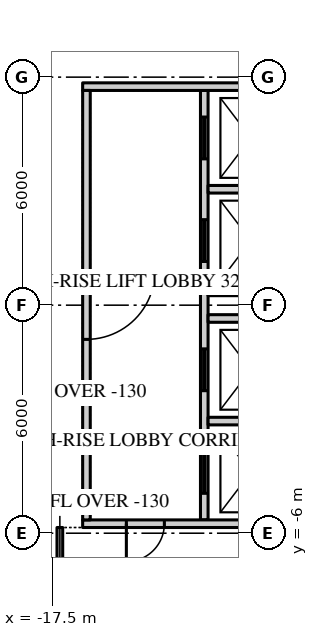
"""IFC4 building model, lengths in metres.
Left out: names, types, materials, properties, quantities, classifications, styles, units other than length and angle.
Written with IfcOpenShell. Run it as: python <this file> out.ifc"""

import sys

from ifc_helpers import new_model, si_unit, direction, frame, frame_2d, origin, place, context, subcontext, project, spatial, rectangle, extrude, element, fill, save


model = new_model("IFC4")
c1 = context("Model", 3, precision=1e-05, world=origin(), true_north=direction((0.0, 1.0)))
c2 = subcontext(c1, "Body", "Model", "MODEL_VIEW")
j1 = project(units=[si_unit("LENGTHUNIT", "METRE"), si_unit("PLANEANGLEUNIT", "RADIAN")], contexts=[c1])
p1 = place(None, origin())
s1 = spatial("IfcSite", under=j1, at=p1, CompositionType="ELEMENT")
p2 = place(p1, origin())
s2 = spatial("IfcBuilding", under=s1, at=p2, CompositionType="ELEMENT")
p3 = place(p2, frame((0.0, 0.0, 204.9)))
s3 = spatial("IfcBuildingStorey", under=s2, at=p3, CompositionType="ELEMENT", Elevation=204.9)
p4 = place(p3, frame((-13.5, 5.65, 0.0), z_axis=(0.0, 0.0, 1.0), x_axis=(0.0, -1.0, 0.0)))
e1 = element("IfcWall", 1, at=p4, inside=s3, PredefinedType="SOLIDWALL", context=c2, shape_type="SweptSolid", body=[
    extrude(rectangle(XDim=11.3, YDim=0.2, at=frame_2d((5.65, 0.0))), origin(), (0.0, 0.0, 1.0), 3.7),
])
p5 = place(p4, frame((0.7, 0.0, 0.0)))
e2 = element("IfcOpeningElement", 2, at=p5, cuts=e1, PredefinedType="OPENING", context=c2, shape_type="SweptSolid", body=[
    extrude(rectangle(XDim=1.1, YDim=2.2, at=frame_2d((0.55, 1.1))), frame((0.0, 0.11, 0.0), z_axis=(0.0, -1.0, 0.0), x_axis=(1.0, 0.0, 0.0)), (0.0, 0.0, 1.0), 0.22),
])
p6 = place(p4, frame((3.4, 0.0, 0.0)))
e3 = element("IfcOpeningElement", 3, at=p6, cuts=e1, PredefinedType="OPENING", context=c2, shape_type="SweptSolid", body=[
    extrude(rectangle(XDim=1.1, YDim=2.2, at=frame_2d((0.55, 1.1))), frame((0.0, 0.11, 0.0), z_axis=(0.0, -1.0, 0.0), x_axis=(1.0, 0.0, 0.0)), (0.0, 0.0, 1.0), 0.22),
])
p7 = place(p4, frame((6.8, 0.0, 0.0)))
e4 = element("IfcOpeningElement", 4, at=p7, cuts=e1, PredefinedType="OPENING", context=c2, shape_type="SweptSolid", body=[
    extrude(rectangle(XDim=1.1, YDim=2.2, at=frame_2d((0.55, 1.1))), frame((0.0, 0.11, 0.0), z_axis=(0.0, -1.0, 0.0), x_axis=(1.0, 0.0, 0.0)), (0.0, 0.0, 1.0), 0.22),
])
p8 = place(p4, frame((9.5, 0.0, 0.0)))
e5 = element("IfcOpeningElement", 5, at=p8, cuts=e1, PredefinedType="OPENING", context=c2, shape_type="SweptSolid", body=[
    extrude(rectangle(XDim=1.1, YDim=2.2, at=frame_2d((0.55, 1.1))), frame((0.0, 0.11, 0.0), z_axis=(0.0, -1.0, 0.0), x_axis=(1.0, 0.0, 0.0)), (0.0, 0.0, 1.0), 0.22),
])
p9 = place(p3, frame((-11.15, 5.75, 0.0), z_axis=(0.0, 0.0, 1.0), x_axis=(-1.0, 0.0, 0.0)))
e6 = element("IfcWall", 6, at=p9, inside=s3, PredefinedType="SOLIDWALL", context=c2, shape_type="SweptSolid", body=[
    extrude(rectangle(XDim=5.55, YDim=0.2, at=frame_2d((2.775, 0.0))), origin(), (0.0, 0.0, 1.0), 3.7),
])
p10 = place(p3, frame((-11.15, -5.75, 0.0), z_axis=(0.0, 0.0, 1.0), x_axis=(-1.0, 0.0, 0.0)))
e7 = element("IfcWall", 7, at=p10, inside=s3, PredefinedType="SOLIDWALL", context=c2, shape_type="SweptSolid", body=[
    extrude(rectangle(XDim=5.55, YDim=0.2, at=frame_2d((2.775, 0.0))), origin(), (0.0, 0.0, 1.0), 3.7),
])
p11 = place(p10, frame((3.4, 0.0, 0.0)))
e8 = element("IfcOpeningElement", 8, at=p11, cuts=e7, PredefinedType="OPENING", context=c2, shape_type="SweptSolid", body=[
    extrude(rectangle(XDim=1.0, YDim=2.2, at=frame_2d((0.5, 1.1))), frame((0.0, 0.11, 0.0), z_axis=(0.0, -1.0, 0.0), x_axis=(1.0, 0.0, 0.0)), (0.0, 0.0, 1.0), 0.22),
])
for number, where, z_axis, x_axis in (
    (9, (-11.15, 3.05, 0.0), (0.0, 0.0, 1.0), (-1.0, 0.0, 0.0)),
    (10, (-11.15, 0.35, 0.0), (0.0, 0.0, 1.0), (-1.0, 0.0, 0.0)),
    (11, (-11.15, -0.35, 0.0), (0.0, 0.0, 1.0), (-1.0, 0.0, 0.0)),
    (12, (-11.15, -3.05, 0.0), (0.0, 0.0, 1.0), (-1.0, 0.0, 0.0)),
):
    element("IfcWall", number, at=place(p3, frame(where, z_axis=z_axis, x_axis=x_axis)), inside=s3, PredefinedType="SOLIDWALL", context=c2, shape_type="SweptSolid", body=[
        extrude(rectangle(XDim=2.25, YDim=0.2, at=frame_2d((1.125, 0.0))), origin(), (0.0, 0.0, 1.0), 3.7),
    ])
p12 = place(p3, frame((-16.6, 5.65, 0.0), z_axis=(0.0, 0.0, 1.0), x_axis=(0.0, -1.0, 0.0)))
e13 = element("IfcWall", 13, at=p12, inside=s3, PredefinedType="SOLIDWALL", context=c2, shape_type="SweptSolid", body=[
    extrude(rectangle(XDim=11.3, YDim=0.2, at=frame_2d((5.65, 0.0))), origin(), (0.0, 0.0, 1.0), 3.18),
])
p13 = place(p12, frame((4.75, 0.0, 0.0)))
e14 = element("IfcOpeningElement", 14, at=p13, cuts=e13, PredefinedType="OPENING", context=c2, shape_type="SweptSolid", body=[
    extrude(rectangle(XDim=1.8, YDim=2.2, at=frame_2d((0.9, 1.1))), frame((0.0, 0.11, 0.0), z_axis=(0.0, -1.0, 0.0), x_axis=(1.0, 0.0, 0.0)), (0.0, 0.0, 1.0), 0.22),
])
p14 = place(p3, frame((-17.3, -5.85, 0.0), z_axis=(0.0, 0.0, 1.0), x_axis=(0.0, -1.0, 0.0)))
e15 = element("IfcWall", 15, at=p14, inside=s3, PredefinedType="PARTITIONING", context=c2, shape_type="SweptSolid", body=[
    extrude(rectangle(XDim=3.075, YDim=0.15, at=frame_2d((1.538, 0.0))), origin(), (0.0, 0.0, 1.0), 3.77),
])
p15 = place(p13, origin())
e16 = element("IfcDoor", 16, at=p15, inside=s3, OperationType="DOUBLE_DOOR_DOUBLE_SWING", PredefinedType="DOOR", context=c2, shape_type="SweptSolid", body=[
    extrude(rectangle(XDim=1.8, YDim=2.2, at=frame_2d((0.9, 1.1))), frame((0.0, 0.025, 0.0), z_axis=(0.0, -1.0, 0.0), x_axis=(1.0, 0.0, 0.0)), (0.0, 0.0, 1.0), 0.05),
])
fill(e14, e16)
p16 = place(p5, origin())
e17 = element("IfcDoor", 17, at=p16, inside=s3, OperationType="SLIDING_TO_LEFT", PredefinedType="DOOR", context=c2, shape_type="SweptSolid", body=[
    extrude(rectangle(XDim=1.1, YDim=2.2, at=frame_2d((0.55, 1.1))), frame((0.0, 0.025, 0.0), z_axis=(0.0, -1.0, 0.0), x_axis=(1.0, 0.0, 0.0)), (0.0, 0.0, 1.0), 0.05),
])
fill(e2, e17)
p17 = place(p6, origin())
e18 = element("IfcDoor", 18, at=p17, inside=s3, OperationType="SLIDING_TO_LEFT", PredefinedType="DOOR", context=c2, shape_type="SweptSolid", body=[
    extrude(rectangle(XDim=1.1, YDim=2.2, at=frame_2d((0.55, 1.1))), frame((0.0, 0.025, 0.0), z_axis=(0.0, -1.0, 0.0), x_axis=(1.0, 0.0, 0.0)), (0.0, 0.0, 1.0), 0.05),
])
fill(e3, e18)
p18 = place(p7, origin())
e19 = element("IfcDoor", 19, at=p18, inside=s3, OperationType="SLIDING_TO_LEFT", PredefinedType="DOOR", context=c2, shape_type="SweptSolid", body=[
    extrude(rectangle(XDim=1.1, YDim=2.2, at=frame_2d((0.55, 1.1))), frame((0.0, 0.025, 0.0), z_axis=(0.0, -1.0, 0.0), x_axis=(1.0, 0.0, 0.0)), (0.0, 0.0, 1.0), 0.05),
])
fill(e4, e19)
p19 = place(p8, origin())
e20 = element("IfcDoor", 20, at=p19, inside=s3, OperationType="SLIDING_TO_LEFT", PredefinedType="DOOR", context=c2, shape_type="SweptSolid", body=[
    extrude(rectangle(XDim=1.1, YDim=2.2, at=frame_2d((0.55, 1.1))), frame((0.0, 0.025, 0.0), z_axis=(0.0, -1.0, 0.0), x_axis=(1.0, 0.0, 0.0)), (0.0, 0.0, 1.0), 0.05),
])
fill(e5, e20)
p20 = place(p11, origin())
e21 = element("IfcDoor", 21, at=p20, inside=s3, OperationType="SINGLE_SWING_RIGHT", PredefinedType="DOOR", context=c2, shape_type="SweptSolid", body=[
    extrude(rectangle(XDim=1.0, YDim=2.2, at=frame_2d((0.5, 1.1))), frame((0.0, 0.025, 0.0), z_axis=(0.0, -1.0, 0.0), x_axis=(1.0, 0.0, 0.0)), (0.0, 0.0, 1.0), 0.05),
])
fill(e8, e21)
save(model, sys.argv[1])
